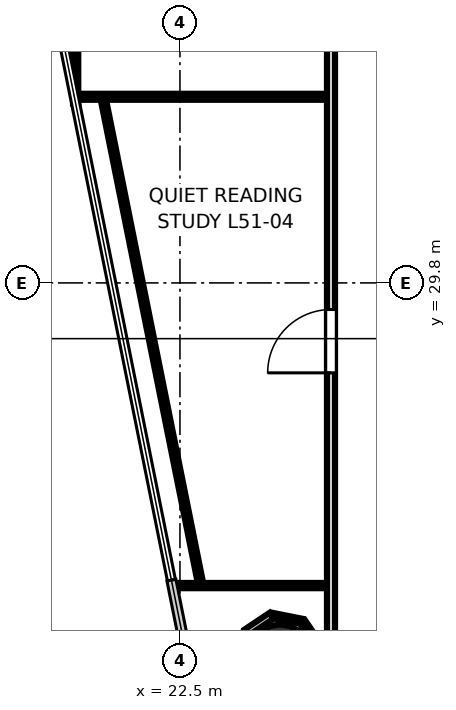
"""IFC4 building model, lengths in metres.
Left out: names, types, materials, properties, quantities, classifications, styles, units other than length and angle.
Written with IfcOpenShell. Run it as: python <this file> out.ifc"""

import sys

from ifc_helpers import new_model, si_unit, direction, frame, frame_2d, origin, origin_2d, place, context, subcontext, project, spatial, rectangle, hollow_circle, extrude, element, fill, save


model = new_model("IFC4")
c1 = context("Model", 3, precision=1e-05, world=origin(), true_north=direction((0.0, 1.0)))
c2 = subcontext(c1, "Body", "Model", "MODEL_VIEW")
j1 = project(units=[si_unit("LENGTHUNIT", "METRE"), si_unit("PLANEANGLEUNIT", "RADIAN")], contexts=[c1])
p1 = place(None, origin())
s1 = spatial("IfcSite", under=j1, at=p1, CompositionType="ELEMENT")
p2 = place(p1, origin())
s2 = spatial("IfcBuilding", under=s1, at=p2, CompositionType="ELEMENT")
p3 = place(p2, frame((0.0, 0.0, 200.3)))
s3 = spatial("IfcBuildingStorey", under=s2, at=p3, CompositionType="ELEMENT", Elevation=200.3)
p4 = place(p3, frame((24.472, 22.46, 0.0), z_axis=(0.0, 0.0, 1.0), x_axis=(1.0, 0.0, 0.0)))
e1 = element("IfcColumn", 1, at=p4, inside=s3, PredefinedType="COLUMN", context=c2, shape_type="SweptSolid", body=[
    extrude(hollow_circle(Radius=0.6, WallThickness=0.03, at=origin_2d()), origin(), (0.0, 0.0, 1.0), 3.7),
])
p5 = place(p3, frame((25.481, 18.05, 0.0), z_axis=(0.0, 0.0, 1.0), x_axis=(0.0, 1.0, 0.0)))
e2 = element("IfcWall", 2, at=p5, inside=s3, PredefinedType="PARTITIONING", context=c2, shape_type="SweptSolid", body=[
    extrude(rectangle(XDim=18.219, YDim=0.16, at=frame_2d((9.109, 0.0))), origin(), (0.0, 0.0, 1.0), 2.84),
])
p6 = place(p5, frame((0.649, 0.0, 0.0)))
e3 = element("IfcOpeningElement", 3, at=p6, cuts=e2, PredefinedType="OPENING", context=c2, shape_type="SweptSolid", body=[
    extrude(rectangle(XDim=1.05, YDim=2.15, at=frame_2d((0.525, 1.075))), frame((0.0, 0.09, 0.0), z_axis=(0.0, -1.0, 0.0), x_axis=(1.0, 0.0, 0.0)), (0.0, 0.0, 1.0), 0.18),
])
p7 = place(p5, frame((9.975, 0.0, 0.0)))
e4 = element("IfcOpeningElement", 4, at=p7, cuts=e2, PredefinedType="OPENING", context=c2, shape_type="SweptSolid", body=[
    extrude(rectangle(XDim=1.25, YDim=2.2, at=frame_2d((0.625, 1.1))), frame((0.0, 0.09, 0.0), z_axis=(0.0, -1.0, 0.0), x_axis=(1.0, 0.0, 0.0)), (0.0, 0.0, 1.0), 0.18),
])
p8 = place(p3, frame((25.238, 22.644, 0.0), z_axis=(0.0, 0.0, 1.0), x_axis=(-0.563363697458, 0.826209019792, 0.0)))
e5 = element("IfcWall", 5, at=p8, inside=s3, PredefinedType="PARTITIONING", context=c2, shape_type="SweptSolid", body=[
    extrude(rectangle(XDim=0.564, YDim=0.12, at=frame_2d((0.282, 0.0))), origin(), (0.0, 0.0, 1.0), 2.84),
])
p9 = place(p3, frame((24.9, 23.122, 0.0), z_axis=(0.0, 0.0, 1.0), x_axis=(-0.980773892286, 0.195147565217, 0.0)))
e6 = element("IfcWall", 6, at=p9, inside=s3, PredefinedType="PARTITIONING", context=c2, shape_type="SweptSolid", body=[
    extrude(rectangle(XDim=0.582, YDim=0.105, at=frame_2d((0.291, 0.0))), origin(), (0.0, 0.0, 1.0), 2.84),
])
p10 = place(p3, frame((24.306, 23.231, 0.0), z_axis=(0.0, 0.0, 1.0), x_axis=(-0.831274401047, -0.555862276256, 0.0)))
e7 = element("IfcWall", 7, at=p10, inside=s3, PredefinedType="PARTITIONING", context=c2, shape_type="SweptSolid", body=[
    extrude(rectangle(XDim=0.582, YDim=0.14, at=frame_2d((0.291, 0.0))), origin(), (0.0, 0.0, 1.0), 2.84),
])
p11 = place(p3, frame((22.333, 23.827, 0.0), z_axis=(0.0, 0.0, 1.0), x_axis=(1.0, 0.0, 0.0)))
e8 = element("IfcWall", 8, at=p11, inside=s3, PredefinedType="PARTITIONING", context=c2, shape_type="SweptSolid", body=[
    extrude(rectangle(XDim=3.037, YDim=0.105, at=frame_2d((1.519, 0.0))), origin(), (0.0, 0.0, 1.0), 2.84),
])
p12 = place(p3, frame((25.37, 33.473, 0.0), z_axis=(0.0, 0.0, 1.0), x_axis=(-1.0, 0.0, 0.0)))
e9 = element("IfcWall", 9, at=p12, inside=s3, PredefinedType="PARTITIONING", context=c2, shape_type="SweptSolid", body=[
    extrude(rectangle(XDim=4.975, YDim=0.12, at=frame_2d((2.488, 0.0))), origin(), (0.0, 0.0, 1.0), 2.84),
])
p13 = place(p3, frame((20.442, 33.34, 0.0), z_axis=(0.0, 0.0, 1.0), x_axis=(-0.000608960305, 0.999999814584, 0.0)))
e10 = element("IfcWall", 10, at=p13, inside=s3, PredefinedType="PARTITIONING", context=c2, shape_type="SweptSolid", body=[
    extrude(rectangle(XDim=2.806, YDim=0.105, at=frame_2d((1.403, 0.0))), origin(), (0.0, 0.0, 1.0), 2.84),
])
p14 = place(p3, frame((22.891, 23.948, 0.0), z_axis=(0.0, 0.0, 1.0), x_axis=(-0.196981324141, 0.980407240865, 0.0)))
e11 = element("IfcWall", 11, at=p14, inside=s3, PredefinedType="PARTITIONING", context=c2, shape_type="SweptSolid", body=[
    extrude(rectangle(XDim=9.604, YDim=0.105, at=frame_2d((4.802, 0.0))), origin(), (0.0, 0.0, 1.0), 2.84),
])
p15 = place(p7, origin())
e12 = element("IfcDoor", 12, at=p15, inside=s3, OperationType="SINGLE_SWING_LEFT", PredefinedType="DOOR", context=c2, shape_type="SweptSolid", body=[
    extrude(rectangle(XDim=1.25, YDim=2.2, at=frame_2d((0.625, 1.1))), frame((0.0, 0.025, 0.0), z_axis=(0.0, -1.0, 0.0), x_axis=(1.0, 0.0, 0.0)), (0.0, 0.0, 1.0), 0.05),
])
fill(e4, e12)
save(model, sys.argv[1])
